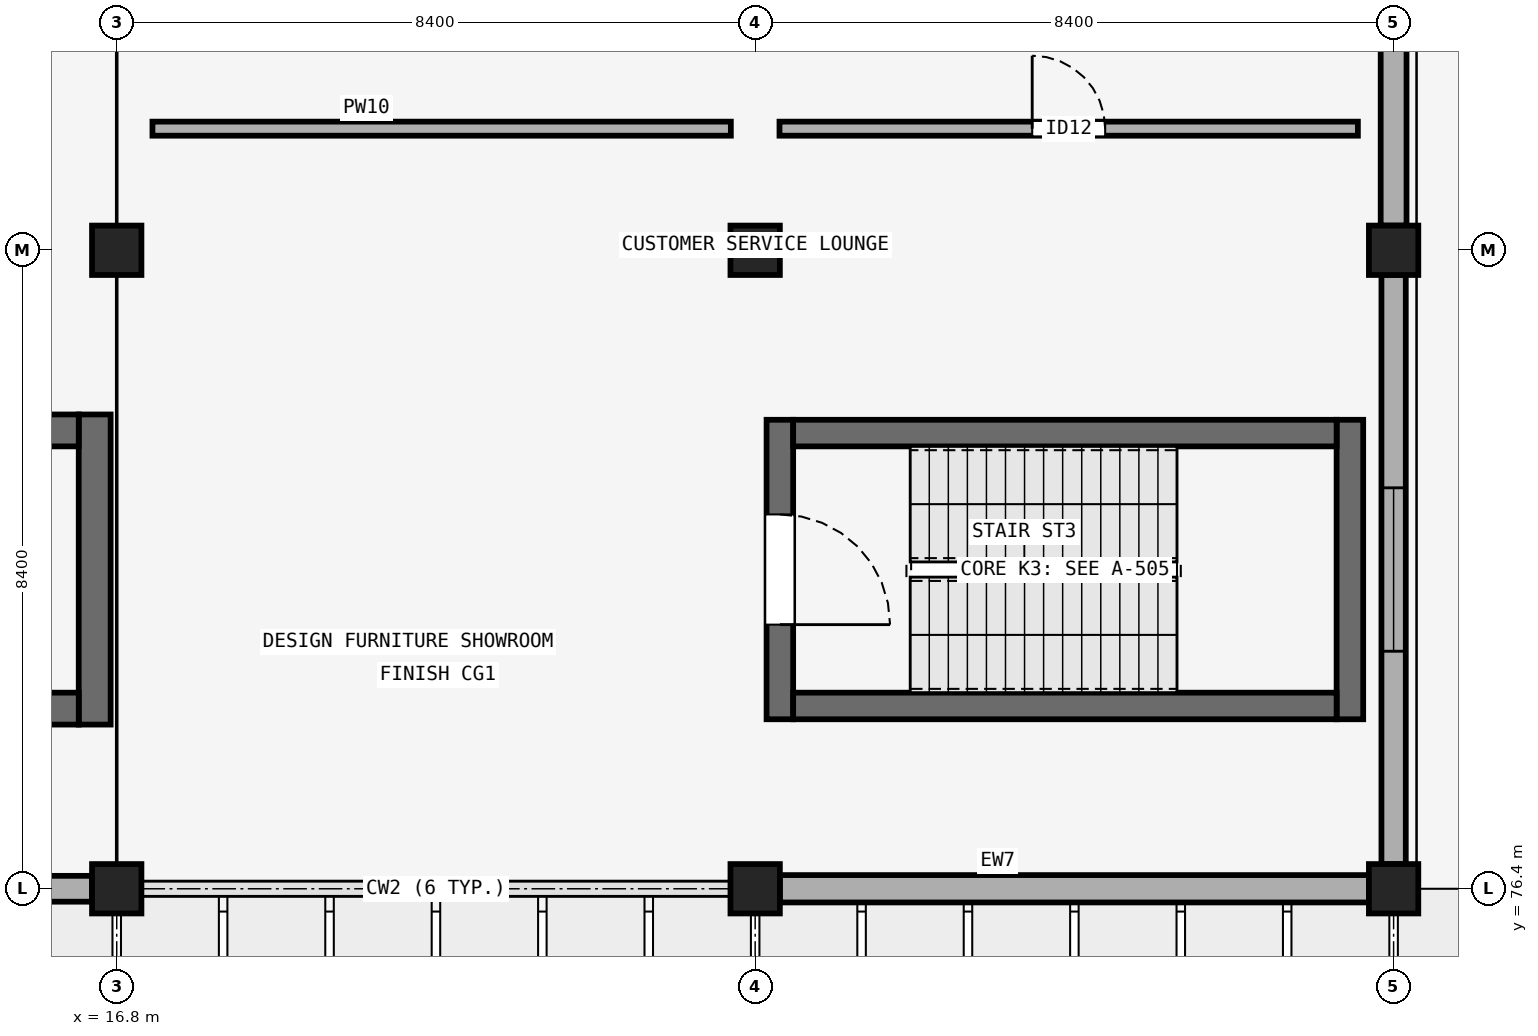
"""IFC4 building model, lengths in metres.
Left out: names, types, materials, properties, quantities, classifications, styles, units other than length and angle.
Written with IfcOpenShell. Run it as: python <this file> out.ifc"""

import sys

from ifc_helpers import new_model, si_unit, direction, frame, frame_2d, origin, origin_2d, place, context, subcontext, project, spatial, rectangle, extrude, element, fill, save


model = new_model("IFC4")
c1 = context("Model", 3, precision=1e-05, world=origin(), true_north=direction((0.0, 1.0)))
c2 = subcontext(c1, "Body", "Model", "MODEL_VIEW")
j1 = project(units=[si_unit("LENGTHUNIT", "METRE"), si_unit("PLANEANGLEUNIT", "RADIAN")], contexts=[c1])
p1 = place(None, origin())
s1 = spatial("IfcSite", under=j1, at=p1, CompositionType="ELEMENT")
p2 = place(p1, origin())
s2 = spatial("IfcBuilding", under=s1, at=p2, CompositionType="ELEMENT")
p3 = place(p2, frame((0.0, 0.0, 27.9)))
s3 = spatial("IfcBuildingStorey", under=s2, at=p3, CompositionType="ELEMENT", Elevation=27.9)
for number, where, z_axis, x_axis in (
    (1, (16.8, 76.4, 0.0), (0.0, 0.0, 1.0), (1.0, 0.0, 0.0)),
    (2, (25.2, 76.4, 0.0), (0.0, 0.0, 1.0), (1.0, 0.0, 0.0)),
    (3, (33.6, 76.4, 0.0), (0.0, 0.0, 1.0), (1.0, 0.0, 0.0)),
    (4, (16.8, 84.8, 0.0), (0.0, 0.0, 1.0), (1.0, 0.0, 0.0)),
    (5, (25.2, 84.8, 0.0), (0.0, 0.0, 1.0), (1.0, 0.0, 0.0)),
    (6, (33.6, 84.8, 0.0), (0.0, 0.0, 1.0), (1.0, 0.0, 0.0)),
):
    element("IfcColumn", number, at=place(p3, frame(where, z_axis=z_axis, x_axis=x_axis)), inside=s3, PredefinedType="COLUMN", context=c2, shape_type="SweptSolid", body=[
        extrude(rectangle(XDim=0.65, YDim=0.65, at=origin_2d()), origin(), (0.0, 0.0, 1.0), 4.5),
    ])
p4 = place(p3, frame((8.725, 76.4, 0.0), z_axis=(0.0, 0.0, 1.0), x_axis=(1.0, 0.0, 0.0)))
e7 = element("IfcWall", 7, at=p4, inside=s3, PredefinedType="SOLIDWALL", context=c2, shape_type="SweptSolid", body=[
    extrude(rectangle(XDim=7.75, YDim=0.34, at=frame_2d((3.875, 0.0))), origin(), (0.0, 0.0, 1.0), 1.74),
])
p5 = place(p3, frame((25.525, 76.4, 0.0), z_axis=(0.0, 0.0, 1.0), x_axis=(1.0, 0.0, 0.0)))
e8 = element("IfcWall", 8, at=p5, inside=s3, PredefinedType="SOLIDWALL", context=c2, shape_type="SweptSolid", body=[
    extrude(rectangle(XDim=7.75, YDim=0.36, at=frame_2d((3.875, 0.0))), origin(), (0.0, 0.0, 1.0), 1.74),
])
p6 = place(p3, frame((33.6, 76.725, 0.0), z_axis=(0.0, 0.0, 1.0), x_axis=(0.0, 1.0, 0.0)))
e9 = element("IfcWall", 9, at=p6, inside=s3, PredefinedType="SOLIDWALL", context=c2, shape_type="SweptSolid", body=[
    extrude(rectangle(XDim=7.75, YDim=0.32, at=frame_2d((3.875, 0.0))), origin(), (0.0, 0.0, 1.0), 3.45),
])
p7 = place(p6, frame((2.8, 0.0, 0.95)))
e10 = element("IfcOpeningElement", 10, at=p7, cuts=e9, PredefinedType="OPENING", context=c2, shape_type="SweptSolid", body=[
    extrude(rectangle(XDim=2.15, YDim=1.85, at=frame_2d((1.075, 0.925))), frame((0.0, 0.17, 0.0), z_axis=(0.0, -1.0, 0.0), x_axis=(1.0, 0.0, 0.0)), (0.0, 0.0, 1.0), 0.34),
])
p8 = place(p3, frame((33.6, 85.125, 0.0), z_axis=(0.0, 0.0, 1.0), x_axis=(0.0, 1.0, 0.0)))
e11 = element("IfcWall", 11, at=p8, inside=s3, PredefinedType="SOLIDWALL", context=c2, shape_type="SweptSolid", body=[
    extrude(rectangle(XDim=7.75, YDim=0.34, at=frame_2d((3.875, 0.0))), origin(), (0.0, 0.0, 1.0), 3.45),
])
p9 = place(p8, frame((2.95, 0.0, 0.0)))
e12 = element("IfcOpeningElement", 12, at=p9, cuts=e11, PredefinedType="OPENING", context=c2, shape_type="SweptSolid", body=[
    extrude(rectangle(XDim=1.85, YDim=2.3, at=frame_2d((0.925, 1.15))), frame((0.0, 0.18, 0.0), z_axis=(0.0, -1.0, 0.0), x_axis=(1.0, 0.0, 0.0)), (0.0, 0.0, 1.0), 0.36),
])
p10 = place(p3, frame((16.51, 78.56, 0.0), z_axis=(0.0, 0.0, 1.0), x_axis=(0.0, 1.0, 0.0)))
e13 = element("IfcWall", 13, at=p10, inside=s3, PredefinedType="SHEAR", context=c2, shape_type="SweptSolid", body=[
    extrude(rectangle(XDim=4.08, YDim=0.42, at=frame_2d((2.04, 0.0))), origin(), (0.0, 0.0, 1.0), 4.2),
])
for number, where, z_axis, x_axis in (
    (14, (8.9, 78.77, 0.0), (0.0, 0.0, 1.0), (1.0, 0.0, 0.0)),
    (15, (8.9, 82.43, 0.0), (0.0, 0.0, 1.0), (1.0, 0.0, 0.0)),
):
    element("IfcWall", number, at=place(p3, frame(where, z_axis=z_axis, x_axis=x_axis)), inside=s3, PredefinedType="SHEAR", context=c2, shape_type="SweptSolid", body=[
        extrude(rectangle(XDim=7.4, YDim=0.42, at=frame_2d((3.7, 0.0))), origin(), (0.0, 0.0, 1.0), 4.2),
    ])
p11 = place(p3, frame((25.525, 82.57, 0.0), z_axis=(0.0, 0.0, 1.0), x_axis=(0.0, -1.0, 0.0)))
e16 = element("IfcWall", 16, at=p11, inside=s3, PredefinedType="SHEAR", context=c2, shape_type="SweptSolid", body=[
    extrude(rectangle(XDim=3.94, YDim=0.35, at=frame_2d((1.97, 0.0))), origin(), (0.0, 0.0, 1.0), 4.2),
])
p12 = place(p11, frame((1.245, 0.0, 0.0)))
e17 = element("IfcOpeningElement", 17, at=p12, cuts=e16, PredefinedType="OPENING", context=c2, shape_type="SweptSolid", body=[
    extrude(rectangle(XDim=1.45, YDim=2.2, at=frame_2d((0.725, 1.1))), frame((0.0, 0.185, 0.0), z_axis=(0.0, -1.0, 0.0), x_axis=(1.0, 0.0, 0.0)), (0.0, 0.0, 1.0), 0.37),
])
p13 = place(p3, frame((33.025, 78.63, 0.0), z_axis=(0.0, 0.0, 1.0), x_axis=(0.0, 1.0, 0.0)))
e18 = element("IfcWall", 18, at=p13, inside=s3, PredefinedType="SHEAR", context=c2, shape_type="SweptSolid", body=[
    extrude(rectangle(XDim=3.94, YDim=0.35, at=frame_2d((1.97, 0.0))), origin(), (0.0, 0.0, 1.0), 4.2),
])
for number, where, z_axis, x_axis in (
    (19, (25.7, 78.805, 0.0), (0.0, 0.0, 1.0), (1.0, 0.0, 0.0)),
    (20, (25.7, 82.395, 0.0), (0.0, 0.0, 1.0), (1.0, 0.0, 0.0)),
):
    element("IfcWall", number, at=place(p3, frame(where, z_axis=z_axis, x_axis=x_axis)), inside=s3, PredefinedType="SHEAR", context=c2, shape_type="SweptSolid", body=[
        extrude(rectangle(XDim=7.15, YDim=0.35, at=frame_2d((3.575, 0.0))), origin(), (0.0, 0.0, 1.0), 4.2),
    ])
p14 = place(p3, frame((17.27, 86.4, 0.0), z_axis=(0.0, 0.0, 1.0), x_axis=(1.0, 0.0, 0.0)))
e21 = element("IfcWall", 21, at=p14, inside=s3, PredefinedType="PARTITIONING", context=c2, shape_type="SweptSolid", body=[
    extrude(rectangle(XDim=7.61, YDim=0.185, at=frame_2d((3.805, 0.0))), origin(), (0.0, 0.0, 1.0), 4.2),
])
p15 = place(p3, frame((25.52, 86.4, 0.0), z_axis=(0.0, 0.0, 1.0), x_axis=(1.0, 0.0, 0.0)))
e22 = element("IfcWall", 22, at=p15, inside=s3, PredefinedType="PARTITIONING", context=c2, shape_type="SweptSolid", body=[
    extrude(rectangle(XDim=7.61, YDim=0.185, at=frame_2d((3.805, 0.0))), origin(), (0.0, 0.0, 1.0), 4.2),
])
p16 = place(p15, frame((3.325, 0.0, 0.0)))
e23 = element("IfcOpeningElement", 23, at=p16, cuts=e22, PredefinedType="OPENING", context=c2, shape_type="SweptSolid", body=[
    extrude(rectangle(XDim=0.96, YDim=2.22, at=frame_2d((0.48, 1.11))), frame((0.0, 0.103, 0.0), z_axis=(0.0, -1.0, 0.0), x_axis=(1.0, 0.0, 0.0)), (0.0, 0.0, 1.0), 0.205),
])
p17 = place(p7, origin())
e24 = element("IfcWindow", 24, at=p17, inside=s3, PartitioningType="DOUBLE_PANEL_VERTICAL", PredefinedType="WINDOW", context=c2, shape_type="SweptSolid", body=[
    extrude(rectangle(XDim=2.15, YDim=1.85, at=frame_2d((1.075, 0.925))), frame((0.0, 0.03, 0.0), z_axis=(0.0, -1.0, 0.0), x_axis=(1.0, 0.0, 0.0)), (0.0, 0.0, 1.0), 0.06),
])
fill(e10, e24)
p18 = place(p12, origin())
e25 = element("IfcDoor", 25, at=p18, inside=s3, OperationType="SINGLE_SWING_RIGHT", PredefinedType="DOOR", context=c2, shape_type="SweptSolid", body=[
    extrude(rectangle(XDim=1.45, YDim=2.2, at=frame_2d((0.725, 1.1))), frame((0.0, 0.025, 0.0), z_axis=(0.0, -1.0, 0.0), x_axis=(1.0, 0.0, 0.0)), (0.0, 0.0, 1.0), 0.05),
])
fill(e17, e25)
p19 = place(p16, origin())
e26 = element("IfcDoor", 26, at=p19, inside=s3, OperationType="SINGLE_SWING_LEFT", PredefinedType="DOOR", context=c2, shape_type="SweptSolid", body=[
    extrude(rectangle(XDim=0.96, YDim=2.22, at=frame_2d((0.48, 1.11))), frame((0.0, 0.025, 0.0), z_axis=(0.0, -1.0, 0.0), x_axis=(1.0, 0.0, 0.0)), (0.0, 0.0, 1.0), 0.05),
])
fill(e23, e26)
save(model, sys.argv[1])
